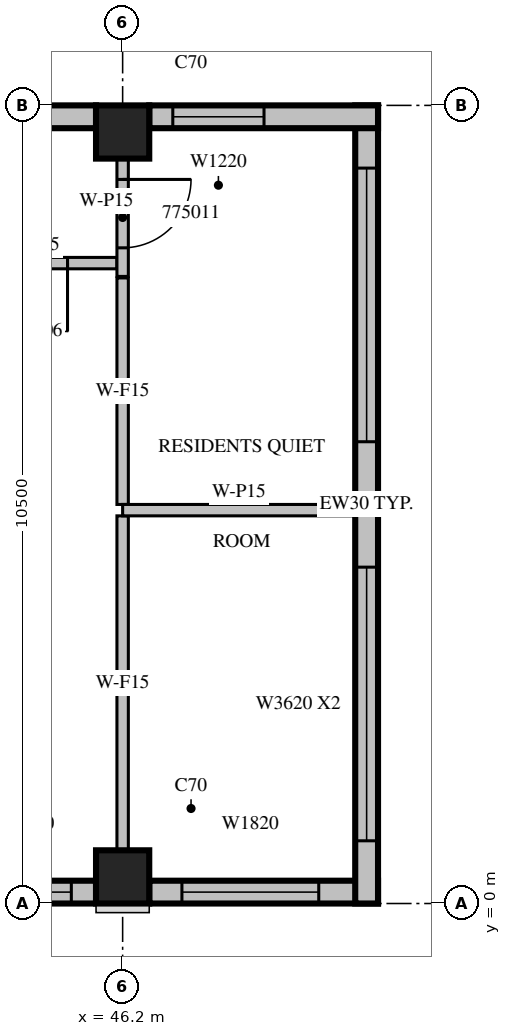
"""IFC4 building model, lengths in metres.
Left out: names, types, materials, properties, quantities, classifications, styles, units other than length and angle.
Written with IfcOpenShell. Run it as: python <this file> out.ifc"""

import sys

from ifc_helpers import new_model, si_unit, direction, frame, frame_2d, origin, origin_2d, place, context, subcontext, project, spatial, rectangle, extrude, source, transform, mapped, element, fill, save


model = new_model("IFC4")
c1 = context("Model", 3, precision=1e-05, world=origin(), true_north=direction((0.0, 1.0)))
c2 = subcontext(c1, "Body", "Model", "MODEL_VIEW")
j1 = project(units=[si_unit("LENGTHUNIT", "METRE"), si_unit("PLANEANGLEUNIT", "RADIAN")], contexts=[c1])
p1 = place(None, origin())
s1 = spatial("IfcSite", under=j1, at=p1, CompositionType="ELEMENT")
p2 = place(p1, origin())
s2 = spatial("IfcBuilding", under=s1, at=p2, CompositionType="ELEMENT")
p3 = place(p2, frame((0.0, 0.0, 323.0)))
s3 = spatial("IfcBuildingStorey", under=s2, at=p3, CompositionType="ELEMENT", Elevation=323.0)
m1 = source(origin(), c2, "Body", "SweptSolid", [
    extrude(rectangle(XDim=0.7, YDim=0.7, at=origin_2d()), origin(), (0.0, 0.0, 1.0), 3.5),
])
for number, where, z_axis, x_axis in (
    (1, (46.2, 0.35, 0.0), (0.0, 0.0, 1.0), (1.0, 0.0, 0.0)),
    (2, (46.2, 10.15, 0.0), (0.0, 0.0, 1.0), (1.0, 0.0, 0.0)),
):
    element("IfcColumn", number, at=place(p3, frame(where, z_axis=z_axis, x_axis=x_axis)), inside=s3, PredefinedType="COLUMN", context=c2, shape_type="MappedRepresentation", body=[
        mapped(m1, transform((0.0, 0.0, 0.0), scale=1.0)),
    ])
m2 = source(origin(), c2, "Body", "SweptSolid", [
    extrude(rectangle(XDim=1.85, YDim=0.3, at=frame_2d((0.925, 0.0))), origin(), (0.0, 0.0, 1.0), 3.1),
])
p4 = place(p3, frame((44.0, 0.15, 0.0), z_axis=(0.0, 0.0, 1.0), x_axis=(1.0, 0.0, 0.0)))
e3 = element("IfcWall", 3, at=p4, inside=s3, PredefinedType="STANDARD", context=c2, shape_type="MappedRepresentation", body=[
    mapped(m2, transform((0.0, 0.0, 0.0), scale=1.0)),
])
m3 = source(origin(), c2, "Body", "SweptSolid", [
    extrude(rectangle(XDim=1.2, YDim=2.0, at=frame_2d((0.6, 1.0))), frame((0.0, 0.16, 0.0), z_axis=(0.0, -1.0, 0.0), x_axis=(1.0, 0.0, 0.0)), (0.0, 0.0, 1.0), 0.32),
])
p5 = place(p4, frame((0.325, 0.0, 0.6)))
e4 = element("IfcOpeningElement", 4, at=p5, cuts=e3, PredefinedType="OPENING", context=c2, shape_type="MappedRepresentation", body=[
    mapped(m3, transform((0.0, 0.0, 0.0), scale=1.0)),
])
m4 = source(origin(), c2, "Body", "SweptSolid", [
    extrude(rectangle(XDim=3.01, YDim=0.3, at=frame_2d((1.505, 0.0))), origin(), (0.0, 0.0, 1.0), 3.1),
])
p6 = place(p3, frame((46.55, 0.15, 0.0), z_axis=(0.0, 0.0, 1.0), x_axis=(1.0, 0.0, 0.0)))
e5 = element("IfcWall", 5, at=p6, inside=s3, PredefinedType="STANDARD", context=c2, shape_type="MappedRepresentation", body=[
    mapped(m4, transform((0.0, 0.0, 0.0), scale=1.0)),
])
m5 = source(origin(), c2, "Body", "SweptSolid", [
    extrude(rectangle(XDim=1.8, YDim=2.0, at=frame_2d((0.9, 1.0))), frame((0.0, 0.16, 0.0), z_axis=(0.0, -1.0, 0.0), x_axis=(1.0, 0.0, 0.0)), (0.0, 0.0, 1.0), 0.32),
])
p7 = place(p6, frame((0.43, 0.0, 0.6)))
e6 = element("IfcOpeningElement", 6, at=p7, cuts=e5, PredefinedType="OPENING", context=c2, shape_type="MappedRepresentation", body=[
    mapped(m5, transform((0.0, 0.0, 0.0), scale=1.0)),
])
m6 = source(origin(), c2, "Body", "SweptSolid", [
    extrude(rectangle(XDim=10.5, YDim=0.3, at=frame_2d((5.25, 0.0))), origin(), (0.0, 0.0, 1.0), 3.1),
])
p8 = place(p3, frame((49.41, 0.0, 0.0), z_axis=(0.0, 0.0, 1.0), x_axis=(0.0, 1.0, 0.0)))
e7 = element("IfcWall", 7, at=p8, inside=s3, PredefinedType="STANDARD", context=c2, shape_type="MappedRepresentation", body=[
    mapped(m6, transform((0.0, 0.0, 0.0), scale=1.0)),
])
m7 = source(origin(), c2, "Body", "SweptSolid", [
    extrude(rectangle(XDim=3.6, YDim=2.0, at=frame_2d((1.8, 1.0))), frame((0.0, 0.16, 0.0), z_axis=(0.0, -1.0, 0.0), x_axis=(1.0, 0.0, 0.0)), (0.0, 0.0, 1.0), 0.32),
])
p9 = place(p8, frame((0.825, 0.0, 0.6)))
e8 = element("IfcOpeningElement", 8, at=p9, cuts=e7, PredefinedType="OPENING", context=c2, shape_type="MappedRepresentation", body=[
    mapped(m7, transform((0.0, 0.0, 0.0), scale=1.0)),
])
p10 = place(p8, frame((6.075, 0.0, 0.6)))
e9 = element("IfcOpeningElement", 9, at=p10, cuts=e7, PredefinedType="OPENING", context=c2, shape_type="MappedRepresentation", body=[
    mapped(m7, transform((0.0, 0.0, 0.0), scale=1.0)),
])
p11 = place(p3, frame((49.56, 10.35, 0.0), z_axis=(0.0, 0.0, 1.0), x_axis=(-1.0, 0.0, 0.0)))
e10 = element("IfcWall", 10, at=p11, inside=s3, PredefinedType="STANDARD", context=c2, shape_type="MappedRepresentation", body=[
    mapped(m4, transform((0.0, 0.0, 0.0), scale=1.0)),
])
p12 = place(p11, frame((1.5, 0.0, 0.6)))
e11 = element("IfcOpeningElement", 11, at=p12, cuts=e10, PredefinedType="OPENING", context=c2, shape_type="MappedRepresentation", body=[
    mapped(m3, transform((0.0, 0.0, 0.0), scale=1.0)),
])
m8 = source(origin(), c2, "Body", "SweptSolid", [
    extrude(rectangle(XDim=7.7, YDim=0.3, at=frame_2d((3.85, 0.0))), origin(), (0.0, 0.0, 1.0), 3.1),
])
p13 = place(p3, frame((45.85, 10.35, 0.0), z_axis=(0.0, 0.0, 1.0), x_axis=(-1.0, 0.0, 0.0)))
e12 = element("IfcWall", 12, at=p13, inside=s3, PredefinedType="STANDARD", context=c2, shape_type="MappedRepresentation", body=[
    mapped(m8, transform((0.0, 0.0, 0.0), scale=1.0)),
])
m9 = source(origin(), c2, "Body", "SweptSolid", [
    extrude(rectangle(XDim=3.0, YDim=2.0, at=frame_2d((1.5, 1.0))), frame((0.0, 0.16, 0.0), z_axis=(0.0, -1.0, 0.0), x_axis=(1.0, 0.0, 0.0)), (0.0, 0.0, 1.0), 0.32),
])
p14 = place(p13, frame((1.09, 0.0, 0.6)))
e13 = element("IfcOpeningElement", 13, at=p14, cuts=e12, PredefinedType="OPENING", context=c2, shape_type="MappedRepresentation", body=[
    mapped(m9, transform((0.0, 0.0, 0.0), scale=1.0)),
])
p15 = place(p13, frame((6.19, 0.0, 0.6)))
e14 = element("IfcOpeningElement", 14, at=p15, cuts=e12, PredefinedType="OPENING", context=c2, shape_type="MappedRepresentation", body=[
    mapped(m3, transform((0.0, 0.0, 0.0), scale=1.0)),
])
m10 = source(origin(), c2, "Body", "SweptSolid", [
    extrude(rectangle(XDim=2.2, YDim=0.15, at=frame_2d((1.1, 0.0))), origin(), (0.0, 0.0, 1.0), 3.1),
])
p16 = place(p3, frame((46.125, 8.425, 0.0), z_axis=(0.0, 0.0, 1.0), x_axis=(-1.0, 0.0, 0.0)))
e15 = element("IfcWall", 15, at=p16, inside=s3, PredefinedType="PARTITIONING", context=c2, shape_type="MappedRepresentation", body=[
    mapped(m10, transform((0.0, 0.0, 0.0), scale=1.0)),
])
m11 = source(origin(), c2, "Body", "SweptSolid", [
    extrude(rectangle(XDim=0.9, YDim=2.1, at=frame_2d((0.45, 1.05))), frame((0.0, 0.085, 0.0), z_axis=(0.0, -1.0, 0.0), x_axis=(1.0, 0.0, 0.0)), (0.0, 0.0, 1.0), 0.17),
])
p17 = place(p16, frame((0.65, 0.0, 0.0)))
e16 = element("IfcOpeningElement", 16, at=p17, cuts=e15, PredefinedType="OPENING", context=c2, shape_type="MappedRepresentation", body=[
    mapped(m11, transform((0.0, 0.0, 0.0), scale=1.0)),
])
m12 = source(origin(), c2, "Body", "SweptSolid", [
    extrude(rectangle(XDim=1.551, YDim=0.15, at=frame_2d((0.775, 0.0))), origin(), (0.0, 0.0, 1.0), 3.1),
])
p18 = place(p3, frame((46.2, 9.801, 0.0), z_axis=(0.0, 0.0, 1.0), x_axis=(0.0, -1.0, 0.0)))
e17 = element("IfcWall", 17, at=p18, inside=s3, PredefinedType="PARTITIONING", context=c2, shape_type="MappedRepresentation", body=[
    mapped(m12, transform((0.0, 0.0, 0.0), scale=1.0)),
])
p19 = place(p18, frame((0.275, 0.0, 0.0)))
e18 = element("IfcOpeningElement", 18, at=p19, cuts=e17, PredefinedType="OPENING", context=c2, shape_type="MappedRepresentation", body=[
    mapped(m11, transform((0.0, 0.0, 0.0), scale=1.0)),
])
m13 = source(origin(), c2, "Body", "SweptSolid", [
    extrude(rectangle(XDim=4.401, YDim=0.15, at=frame_2d((2.2, 0.0))), origin(), (0.0, 0.0, 1.0), 3.1),
])
p20 = place(p3, frame((46.2, 0.699, 0.0), z_axis=(0.0, 0.0, 1.0), x_axis=(0.0, 1.0, 0.0)))
e19 = element("IfcWall", 19, at=p20, inside=s3, PredefinedType="PARTITIONING", context=c2, shape_type="MappedRepresentation", body=[
    mapped(m13, transform((0.0, 0.0, 0.0), scale=1.0)),
])
m14 = source(origin(), c2, "Body", "SweptSolid", [
    extrude(rectangle(XDim=2.98, YDim=0.15, at=frame_2d((1.49, 0.0))), origin(), (0.0, 0.0, 1.0), 3.1),
])
p21 = place(p3, frame((46.2, 5.25, 0.0), z_axis=(0.0, 0.0, 1.0), x_axis=(0.0, 1.0, 0.0)))
e20 = element("IfcWall", 20, at=p21, inside=s3, PredefinedType="PARTITIONING", context=c2, shape_type="MappedRepresentation", body=[
    mapped(m14, transform((0.0, 0.0, 0.0), scale=1.0)),
])
m15 = source(origin(), c2, "Body", "SweptSolid", [
    extrude(rectangle(XDim=3.06, YDim=0.15, at=frame_2d((1.53, 0.0))), origin(), (0.0, 0.0, 1.0), 3.1),
])
p22 = place(p3, frame((49.26, 5.175, 0.0), z_axis=(0.0, 0.0, 1.0), x_axis=(-1.0, 0.0, 0.0)))
e21 = element("IfcWall", 21, at=p22, inside=s3, PredefinedType="PARTITIONING", context=c2, shape_type="MappedRepresentation", body=[
    mapped(m15, transform((0.0, 0.0, 0.0), scale=1.0)),
])
m16 = source(origin(), c2, "Body", "SweptSolid", [
    extrude(rectangle(XDim=1.2, YDim=2.0, at=frame_2d((0.6, 1.0))), frame((0.0, 0.03, 0.0), z_axis=(0.0, -1.0, 0.0), x_axis=(1.0, 0.0, 0.0)), (0.0, 0.0, 1.0), 0.06),
])
p23 = place(p5, origin())
e22 = element("IfcWindow", 22, at=p23, inside=s3, PartitioningType="SINGLE_PANEL", PredefinedType="WINDOW", context=c2, shape_type="MappedRepresentation", body=[
    mapped(m16, transform((0.0, 0.0, 0.0), scale=1.0)),
])
fill(e4, e22)
m17 = source(origin(), c2, "Body", "SweptSolid", [
    extrude(rectangle(XDim=1.8, YDim=2.0, at=frame_2d((0.9, 1.0))), frame((0.0, 0.03, 0.0), z_axis=(0.0, -1.0, 0.0), x_axis=(1.0, 0.0, 0.0)), (0.0, 0.0, 1.0), 0.06),
])
p24 = place(p7, origin())
e23 = element("IfcWindow", 23, at=p24, inside=s3, PartitioningType="SINGLE_PANEL", PredefinedType="WINDOW", context=c2, shape_type="MappedRepresentation", body=[
    mapped(m17, transform((0.0, 0.0, 0.0), scale=1.0)),
])
fill(e6, e23)
m18 = source(origin(), c2, "Body", "SweptSolid", [
    extrude(rectangle(XDim=3.6, YDim=2.0, at=frame_2d((1.8, 1.0))), frame((0.0, 0.03, 0.0), z_axis=(0.0, -1.0, 0.0), x_axis=(1.0, 0.0, 0.0)), (0.0, 0.0, 1.0), 0.06),
])
p25 = place(p9, origin())
e24 = element("IfcWindow", 24, at=p25, inside=s3, PartitioningType="SINGLE_PANEL", PredefinedType="WINDOW", context=c2, shape_type="MappedRepresentation", body=[
    mapped(m18, transform((0.0, 0.0, 0.0), scale=1.0)),
])
fill(e8, e24)
p26 = place(p10, origin())
e25 = element("IfcWindow", 25, at=p26, inside=s3, PartitioningType="SINGLE_PANEL", PredefinedType="WINDOW", context=c2, shape_type="MappedRepresentation", body=[
    mapped(m18, transform((0.0, 0.0, 0.0), scale=1.0)),
])
fill(e9, e25)
p27 = place(p12, origin())
e26 = element("IfcWindow", 26, at=p27, inside=s3, PartitioningType="SINGLE_PANEL", PredefinedType="WINDOW", context=c2, shape_type="MappedRepresentation", body=[
    mapped(m16, transform((0.0, 0.0, 0.0), scale=1.0)),
])
fill(e11, e26)
m19 = source(origin(), c2, "Body", "SweptSolid", [
    extrude(rectangle(XDim=0.9, YDim=2.1, at=frame_2d((0.45, 1.05))), frame((0.0, 0.025, 0.0), z_axis=(0.0, -1.0, 0.0), x_axis=(1.0, 0.0, 0.0)), (0.0, 0.0, 1.0), 0.05),
])
p28 = place(p17, origin())
e27 = element("IfcDoor", 27, at=p28, inside=s3, OperationType="SINGLE_SWING_LEFT", PredefinedType="DOOR", context=c2, shape_type="MappedRepresentation", body=[
    mapped(m19, transform((0.0, 0.0, 0.0), scale=1.0)),
])
fill(e16, e27)
p29 = place(p19, origin())
e28 = element("IfcDoor", 28, at=p29, inside=s3, OperationType="SINGLE_SWING_LEFT", PredefinedType="DOOR", context=c2, shape_type="MappedRepresentation", body=[
    mapped(m19, transform((0.0, 0.0, 0.0), scale=1.0)),
])
fill(e18, e28)
save(model, sys.argv[1])
